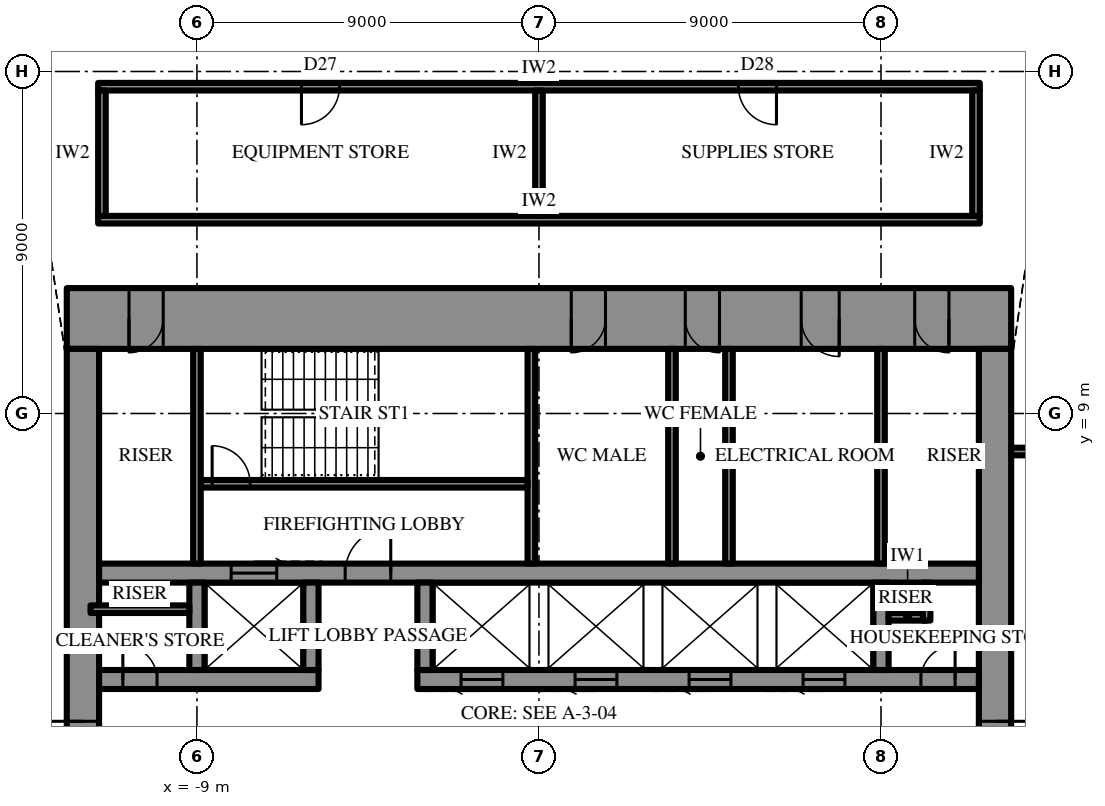
"""IFC4 building model, lengths in metres.
Left out: names, types, materials, properties, quantities, classifications, styles, units other than length and angle.
Written with IfcOpenShell. Run it as: python <this file> out.ifc"""

import sys

from ifc_helpers import new_model, si_unit, direction, frame, frame_2d, origin, place, context, subcontext, project, spatial, rectangle, extrude, element, fill, save


model = new_model("IFC4")
c1 = context("Model", 3, precision=1e-05, world=origin(), true_north=direction((0.0, 1.0)))
c2 = subcontext(c1, "Body", "Model", "MODEL_VIEW")
j1 = project(units=[si_unit("LENGTHUNIT", "METRE"), si_unit("PLANEANGLEUNIT", "RADIAN")], contexts=[c1])
p1 = place(None, origin())
s1 = spatial("IfcSite", under=j1, at=p1, CompositionType="ELEMENT")
p2 = place(p1, origin())
s2 = spatial("IfcBuilding", under=s1, at=p2, CompositionType="ELEMENT")
p3 = place(p2, frame((0.0, 0.0, 357.7)))
s3 = spatial("IfcBuildingStorey", under=s2, at=p3, CompositionType="ELEMENT", Elevation=357.7)
p4 = place(p3, frame((-12.425, 11.5, 0.0), z_axis=(0.0, 0.0, 1.0), x_axis=(1.0, 0.0, 0.0)))
e1 = element("IfcWall", 1, at=p4, inside=s3, PredefinedType="SHEAR", context=c2, shape_type="SweptSolid", body=[
    extrude(rectangle(XDim=24.85, YDim=1.6, at=frame_2d((12.425, 0.0))), origin(), (0.0, 0.0, 1.0), 4.2),
])
p5 = place(p4, frame((13.275, 0.0, 0.0)))
e2 = element("IfcOpeningElement", 2, at=p5, cuts=e1, PredefinedType="OPENING", context=c2, shape_type="SweptSolid", body=[
    extrude(rectangle(XDim=0.9, YDim=2.2, at=frame_2d((0.45, 1.1))), frame((0.0, 0.81, 0.0), z_axis=(0.0, -1.0, 0.0), x_axis=(1.0, 0.0, 0.0)), (0.0, 0.0, 1.0), 1.62),
])
p6 = place(p4, frame((16.275, 0.0, 0.0)))
e3 = element("IfcOpeningElement", 3, at=p6, cuts=e1, PredefinedType="OPENING", context=c2, shape_type="SweptSolid", body=[
    extrude(rectangle(XDim=0.9, YDim=2.2, at=frame_2d((0.45, 1.1))), frame((0.0, 0.81, 0.0), z_axis=(0.0, -1.0, 0.0), x_axis=(1.0, 0.0, 0.0)), (0.0, 0.0, 1.0), 1.62),
])
p7 = place(p4, frame((19.325, 0.0, 0.0)))
e4 = element("IfcOpeningElement", 4, at=p7, cuts=e1, PredefinedType="OPENING", context=c2, shape_type="SweptSolid", body=[
    extrude(rectangle(XDim=1.0, YDim=2.2, at=frame_2d((0.5, 1.1))), frame((0.0, 0.81, 0.0), z_axis=(0.0, -1.0, 0.0), x_axis=(1.0, 0.0, 0.0)), (0.0, 0.0, 1.0), 1.62),
])
p8 = place(p4, frame((1.637, 0.0, 0.0)))
e5 = element("IfcOpeningElement", 5, at=p8, cuts=e1, PredefinedType="OPENING", context=c2, shape_type="SweptSolid", body=[
    extrude(rectangle(XDim=0.9, YDim=2.2, at=frame_2d((0.45, 1.1))), frame((0.0, 0.81, 0.0), z_axis=(0.0, -1.0, 0.0), x_axis=(1.0, 0.0, 0.0)), (0.0, 0.0, 1.0), 1.62),
])
p9 = place(p4, frame((22.312, 0.0, 0.0)))
e6 = element("IfcOpeningElement", 6, at=p9, cuts=e1, PredefinedType="OPENING", context=c2, shape_type="SweptSolid", body=[
    extrude(rectangle(XDim=0.9, YDim=2.2, at=frame_2d((0.45, 1.1))), frame((0.0, 0.81, 0.0), z_axis=(0.0, -1.0, 0.0), x_axis=(1.0, 0.0, 0.0)), (0.0, 0.0, 1.0), 1.62),
])
p10 = place(p3, frame((12.0, -10.7, 0.0), z_axis=(0.0, 0.0, 1.0), x_axis=(0.0, 1.0, 0.0)))
e7 = element("IfcWall", 7, at=p10, inside=s3, PredefinedType="SHEAR", context=c2, shape_type="SweptSolid", body=[
    extrude(rectangle(XDim=21.4, YDim=0.85, at=frame_2d((10.7, 0.0))), origin(), (0.0, 0.0, 1.0), 4.2),
])
p11 = place(p10, frame((9.8, 0.0, 0.0)))
e8 = element("IfcOpeningElement", 8, at=p11, cuts=e7, PredefinedType="OPENING", context=c2, shape_type="SweptSolid", body=[
    extrude(rectangle(XDim=1.8, YDim=2.4, at=frame_2d((0.9, 1.2))), frame((0.0, 0.435, 0.0), z_axis=(0.0, -1.0, 0.0), x_axis=(1.0, 0.0, 0.0)), (0.0, 0.0, 1.0), 0.87),
])
p12 = place(p3, frame((-12.0, 10.7, 0.0), z_axis=(0.0, 0.0, 1.0), x_axis=(0.0, -1.0, 0.0)))
e9 = element("IfcWall", 9, at=p12, inside=s3, PredefinedType="SHEAR", context=c2, shape_type="SweptSolid", body=[
    extrude(rectangle(XDim=21.4, YDim=0.85, at=frame_2d((10.7, 0.0))), origin(), (0.0, 0.0, 1.0), 4.2),
])
p13 = place(p12, frame((9.8, 0.0, 0.0)))
e10 = element("IfcOpeningElement", 10, at=p13, cuts=e9, PredefinedType="OPENING", context=c2, shape_type="SweptSolid", body=[
    extrude(rectangle(XDim=1.8, YDim=2.4, at=frame_2d((0.9, 1.2))), frame((0.0, 0.435, 0.0), z_axis=(0.0, -1.0, 0.0), x_axis=(1.0, 0.0, 0.0)), (0.0, 0.0, 1.0), 0.87),
])
p14 = place(p3, frame((-11.575, 2.0, 0.0), z_axis=(0.0, 0.0, 1.0), x_axis=(1.0, 0.0, 0.0)))
e11 = element("IfcWall", 11, at=p14, inside=s3, PredefinedType="SHEAR", context=c2, shape_type="SweptSolid", body=[
    extrude(rectangle(XDim=5.775, YDim=0.5, at=frame_2d((2.887, 0.0))), origin(), (0.0, 0.0, 1.0), 4.2),
])
p15 = place(p14, frame((0.625, 0.0, 0.0)))
e12 = element("IfcOpeningElement", 12, at=p15, cuts=e11, PredefinedType="OPENING", context=c2, shape_type="SweptSolid", body=[
    extrude(rectangle(XDim=0.9, YDim=2.2, at=frame_2d((0.45, 1.1))), frame((0.0, 0.26, 0.0), z_axis=(0.0, -1.0, 0.0), x_axis=(1.0, 0.0, 0.0)), (0.0, 0.0, 1.0), 0.52),
])
p16 = place(p3, frame((-3.2, 2.0, 0.0), z_axis=(0.0, 0.0, 1.0), x_axis=(1.0, 0.0, 0.0)))
e13 = element("IfcWall", 13, at=p16, inside=s3, PredefinedType="SHEAR", context=c2, shape_type="SweptSolid", body=[
    extrude(rectangle(XDim=14.775, YDim=0.5, at=frame_2d((7.387, 0.0))), origin(), (0.0, 0.0, 1.0), 4.2),
])
p17 = place(p16, frame((13.25, 0.0, 0.0)))
e14 = element("IfcOpeningElement", 14, at=p17, cuts=e13, PredefinedType="OPENING", context=c2, shape_type="SweptSolid", body=[
    extrude(rectangle(XDim=0.9, YDim=2.2, at=frame_2d((0.45, 1.1))), frame((0.0, 0.26, 0.0), z_axis=(0.0, -1.0, 0.0), x_axis=(1.0, 0.0, 0.0)), (0.0, 0.0, 1.0), 0.52),
])
p18 = place(p16, frame((1.15, 0.0, 0.0)))
e15 = element("IfcOpeningElement", 15, at=p18, cuts=e13, PredefinedType="OPENING", context=c2, shape_type="SweptSolid", body=[
    extrude(rectangle(XDim=1.1, YDim=2.2, at=frame_2d((0.55, 1.1))), frame((0.0, 0.26, 0.0), z_axis=(0.0, -1.0, 0.0), x_axis=(1.0, 0.0, 0.0)), (0.0, 0.0, 1.0), 0.52),
])
p19 = place(p16, frame((4.15, 0.0, 0.0)))
e16 = element("IfcOpeningElement", 16, at=p19, cuts=e13, PredefinedType="OPENING", context=c2, shape_type="SweptSolid", body=[
    extrude(rectangle(XDim=1.1, YDim=2.2, at=frame_2d((0.55, 1.1))), frame((0.0, 0.26, 0.0), z_axis=(0.0, -1.0, 0.0), x_axis=(1.0, 0.0, 0.0)), (0.0, 0.0, 1.0), 0.52),
])
p20 = place(p16, frame((7.15, 0.0, 0.0)))
e17 = element("IfcOpeningElement", 17, at=p20, cuts=e13, PredefinedType="OPENING", context=c2, shape_type="SweptSolid", body=[
    extrude(rectangle(XDim=1.1, YDim=2.2, at=frame_2d((0.55, 1.1))), frame((0.0, 0.26, 0.0), z_axis=(0.0, -1.0, 0.0), x_axis=(1.0, 0.0, 0.0)), (0.0, 0.0, 1.0), 0.52),
])
p21 = place(p16, frame((10.15, 0.0, 0.0)))
e18 = element("IfcOpeningElement", 18, at=p21, cuts=e13, PredefinedType="OPENING", context=c2, shape_type="SweptSolid", body=[
    extrude(rectangle(XDim=1.1, YDim=2.2, at=frame_2d((0.55, 1.1))), frame((0.0, 0.26, 0.0), z_axis=(0.0, -1.0, 0.0), x_axis=(1.0, 0.0, 0.0)), (0.0, 0.0, 1.0), 0.52),
])
p22 = place(p3, frame((-11.575, 4.8, 0.0), z_axis=(0.0, 0.0, 1.0), x_axis=(1.0, 0.0, 0.0)))
e19 = element("IfcWall", 19, at=p22, inside=s3, PredefinedType="SHEAR", context=c2, shape_type="SweptSolid", body=[
    extrude(rectangle(XDim=23.15, YDim=0.5, at=frame_2d((11.575, 0.0))), origin(), (0.0, 0.0, 1.0), 4.2),
])
p23 = place(p22, frame((6.475, 0.0, 0.0)))
e20 = element("IfcOpeningElement", 20, at=p23, cuts=e19, PredefinedType="OPENING", context=c2, shape_type="SweptSolid", body=[
    extrude(rectangle(XDim=1.2, YDim=2.2, at=frame_2d((0.6, 1.1))), frame((0.0, 0.26, 0.0), z_axis=(0.0, -1.0, 0.0), x_axis=(1.0, 0.0, 0.0)), (0.0, 0.0, 1.0), 0.52),
])
p24 = place(p22, frame((3.475, 0.0, 0.0)))
e21 = element("IfcOpeningElement", 21, at=p24, cuts=e19, PredefinedType="OPENING", context=c2, shape_type="SweptSolid", body=[
    extrude(rectangle(XDim=1.2, YDim=2.2, at=frame_2d((0.6, 1.1))), frame((0.0, 0.26, 0.0), z_axis=(0.0, -1.0, 0.0), x_axis=(1.0, 0.0, 0.0)), (0.0, 0.0, 1.0), 0.52),
])
for number, where, z_axis, x_axis in (
    (22, (-9.0, 2.25, 0.0), (0.0, 0.0, 1.0), (0.0, 1.0, 0.0)),
    (23, (-6.0, 2.25, 0.0), (0.0, 0.0, 1.0), (0.0, 1.0, 0.0)),
    (24, (-3.0, 2.25, 0.0), (0.0, 0.0, 1.0), (0.0, 1.0, 0.0)),
    (25, (9.0, 2.25, 0.0), (0.0, 0.0, 1.0), (0.0, 1.0, 0.0)),
):
    element("IfcWall", number, at=place(p3, frame(where, z_axis=z_axis, x_axis=x_axis)), inside=s3, PredefinedType="SHEAR", context=c2, shape_type="SweptSolid", body=[
        extrude(rectangle(XDim=2.3, YDim=0.4, at=frame_2d((1.15, 0.0))), origin(), (0.0, 0.0, 1.0), 4.2),
    ])
p25 = place(p3, frame((-0.2, 5.05, 0.0), z_axis=(0.0, 0.0, 1.0), x_axis=(0.0, 1.0, 0.0)))
e26 = element("IfcWall", 26, at=p25, inside=s3, PredefinedType="SHEAR", context=c2, shape_type="SweptSolid", body=[
    extrude(rectangle(XDim=5.65, YDim=0.2, at=frame_2d((2.825, 0.0))), origin(), (0.0, 0.0, 1.0), 4.2),
])
p26 = place(p3, frame((-8.9, 7.15, 0.0), z_axis=(0.0, 0.0, 1.0), x_axis=(1.0, 0.0, 0.0)))
e27 = element("IfcWall", 27, at=p26, inside=s3, PredefinedType="SHEAR", context=c2, shape_type="SweptSolid", body=[
    extrude(rectangle(XDim=8.6, YDim=0.2, at=frame_2d((4.3, 0.0))), origin(), (0.0, 0.0, 1.0), 4.2),
])
p27 = place(p26, frame((0.3, 0.0, 0.0)))
e28 = element("IfcOpeningElement", 28, at=p27, cuts=e27, PredefinedType="OPENING", context=c2, shape_type="SweptSolid", body=[
    extrude(rectangle(XDim=1.0, YDim=2.2, at=frame_2d((0.5, 1.1))), frame((0.0, 0.11, 0.0), z_axis=(0.0, -1.0, 0.0), x_axis=(1.0, 0.0, 0.0)), (0.0, 0.0, 1.0), 0.22),
])
for number, where, z_axis, x_axis in (
    (29, (-9.0, 5.05, 0.0), (0.0, 0.0, 1.0), (0.0, 1.0, 0.0)),
    (30, (9.0, 5.05, 0.0), (0.0, 0.0, 1.0), (0.0, 1.0, 0.0)),
    (31, (3.5, 5.05, 0.0), (0.0, 0.0, 1.0), (0.0, 1.0, 0.0)),
    (32, (5.0, 5.05, 0.0), (0.0, 0.0, 1.0), (0.0, 1.0, 0.0)),
):
    element("IfcWall", number, at=place(p3, frame(where, z_axis=z_axis, x_axis=x_axis)), inside=s3, PredefinedType="PARTITIONING", context=c2, shape_type="SweptSolid", body=[
        extrude(rectangle(XDim=5.65, YDim=0.2, at=frame_2d((2.825, 0.0))), origin(), (0.0, 0.0, 1.0), 4.0),
    ])
p28 = place(p3, frame((-11.8, 3.85, 0.0), z_axis=(0.0, 0.0, 1.0), x_axis=(1.0, 0.0, 0.0)))
e33 = element("IfcWall", 33, at=p28, inside=s3, PredefinedType="PARTITIONING", context=c2, shape_type="SweptSolid", body=[
    extrude(rectangle(XDim=2.6, YDim=0.2, at=frame_2d((1.3, 0.0))), origin(), (0.0, 0.0, 1.0), 4.0),
])
for number, where, z_axis, x_axis in (
    (34, (9.2, 3.65, 0.0), (0.0, 0.0, 1.0), (1.0, 0.0, 0.0)),
    (35, (10.2, 3.55, 0.0), (0.0, 0.0, 1.0), (0.0, 1.0, 0.0)),
):
    element("IfcWall", number, at=place(p3, frame(where, z_axis=z_axis, x_axis=x_axis)), inside=s3, PredefinedType="PARTITIONING", context=c2, shape_type="SweptSolid", body=[
        extrude(rectangle(XDim=1.0, YDim=0.2, at=frame_2d((0.5, 0.0))), origin(), (0.0, 0.0, 1.0), 4.0),
    ])
p29 = place(p3, frame((-11.6, 14.1, 0.0), z_axis=(0.0, 0.0, 1.0), x_axis=(1.0, 0.0, 0.0)))
e36 = element("IfcWall", 36, at=p29, inside=s3, PredefinedType="PARTITIONING", context=c2, shape_type="SweptSolid", body=[
    extrude(rectangle(XDim=23.2, YDim=0.2, at=frame_2d((11.6, 0.0))), origin(), (0.0, 0.0, 1.0), 4.0),
])
p30 = place(p3, frame((-11.6, 17.6, 0.0), z_axis=(0.0, 0.0, 1.0), x_axis=(1.0, 0.0, 0.0)))
e37 = element("IfcWall", 37, at=p30, inside=s3, PredefinedType="PARTITIONING", context=c2, shape_type="SweptSolid", body=[
    extrude(rectangle(XDim=23.2, YDim=0.2, at=frame_2d((11.6, 0.0))), origin(), (0.0, 0.0, 1.0), 4.0),
])
p31 = place(p30, frame((5.35, 0.0, 0.0)))
e38 = element("IfcOpeningElement", 38, at=p31, cuts=e37, PredefinedType="OPENING", context=c2, shape_type="SweptSolid", body=[
    extrude(rectangle(XDim=1.0, YDim=2.2, at=frame_2d((0.5, 1.1))), frame((0.0, 0.11, 0.0), z_axis=(0.0, -1.0, 0.0), x_axis=(1.0, 0.0, 0.0)), (0.0, 0.0, 1.0), 0.22),
])
p32 = place(p30, frame((16.85, 0.0, 0.0)))
e39 = element("IfcOpeningElement", 39, at=p32, cuts=e37, PredefinedType="OPENING", context=c2, shape_type="SweptSolid", body=[
    extrude(rectangle(XDim=1.0, YDim=2.2, at=frame_2d((0.5, 1.1))), frame((0.0, 0.11, 0.0), z_axis=(0.0, -1.0, 0.0), x_axis=(1.0, 0.0, 0.0)), (0.0, 0.0, 1.0), 0.22),
])
p33 = place(p3, frame((-11.5, 14.2, 0.0), z_axis=(0.0, 0.0, 1.0), x_axis=(0.0, 1.0, 0.0)))
e40 = element("IfcWall", 40, at=p33, inside=s3, PredefinedType="PARTITIONING", context=c2, shape_type="SweptSolid", body=[
    extrude(rectangle(XDim=3.3, YDim=0.2, at=frame_2d((1.65, 0.0))), origin(), (0.0, 0.0, 1.0), 4.0),
])
p34 = place(p3, frame((0.0, 14.2, 0.0), z_axis=(0.0, 0.0, 1.0), x_axis=(0.0, 1.0, 0.0)))
e41 = element("IfcWall", 41, at=p34, inside=s3, PredefinedType="PARTITIONING", context=c2, shape_type="SweptSolid", body=[
    extrude(rectangle(XDim=3.3, YDim=0.2, at=frame_2d((1.65, 0.0))), origin(), (0.0, 0.0, 1.0), 2.992),
])
p35 = place(p3, frame((11.5, 14.2, 0.0), z_axis=(0.0, 0.0, 1.0), x_axis=(0.0, 1.0, 0.0)))
e42 = element("IfcWall", 42, at=p35, inside=s3, PredefinedType="PARTITIONING", context=c2, shape_type="SweptSolid", body=[
    extrude(rectangle(XDim=3.3, YDim=0.2, at=frame_2d((1.65, 0.0))), origin(), (0.0, 0.0, 1.0), 4.0),
])
p36 = place(p3, frame((12.425, 8.0, 0.0), z_axis=(0.0, 0.0, 1.0), x_axis=(1.0, 0.0, 0.0)))
e43 = element("IfcWall", 43, at=p36, inside=s3, PredefinedType="PARTITIONING", context=c2, shape_type="SweptSolid", body=[
    extrude(rectangle(XDim=13.59, YDim=0.2, at=frame_2d((6.795, 0.0))), origin(), (0.0, 0.0, 1.0), 4.0),
])
p37 = place(p36, frame((0.859, 0.0, 0.0)))
e44 = element("IfcOpeningElement", 44, at=p37, cuts=e43, PredefinedType="OPENING", context=c2, shape_type="SweptSolid", body=[
    extrude(rectangle(XDim=1.0, YDim=2.2, at=frame_2d((0.5, 1.1))), frame((0.0, 0.11, 0.0), z_axis=(0.0, -1.0, 0.0), x_axis=(1.0, 0.0, 0.0)), (0.0, 0.0, 1.0), 0.22),
])
p38 = place(p11, frame((1.8, 0.0, 0.0), z_axis=(0.0, 0.0, 1.0), x_axis=(-1.0, 0.0, 0.0)))
e45 = element("IfcDoor", 45, at=p38, inside=s3, OperationType="DOUBLE_DOOR_SINGLE_SWING", PredefinedType="DOOR", context=c2, shape_type="SweptSolid", body=[
    extrude(rectangle(XDim=1.8, YDim=2.4, at=frame_2d((0.9, 1.2))), frame((0.0, 0.025, 0.0), z_axis=(0.0, -1.0, 0.0), x_axis=(1.0, 0.0, 0.0)), (0.0, 0.0, 1.0), 0.05),
])
fill(e8, e45)
p39 = place(p13, frame((1.8, 0.0, 0.0), z_axis=(0.0, 0.0, 1.0), x_axis=(-1.0, 0.0, 0.0)))
e46 = element("IfcDoor", 46, at=p39, inside=s3, OperationType="DOUBLE_DOOR_SINGLE_SWING", PredefinedType="DOOR", context=c2, shape_type="SweptSolid", body=[
    extrude(rectangle(XDim=1.8, YDim=2.4, at=frame_2d((0.9, 1.2))), frame((0.0, 0.025, 0.0), z_axis=(0.0, -1.0, 0.0), x_axis=(1.0, 0.0, 0.0)), (0.0, 0.0, 1.0), 0.05),
])
fill(e10, e46)
p40 = place(p23, origin())
e47 = element("IfcDoor", 47, at=p40, inside=s3, OperationType="SINGLE_SWING_LEFT", PredefinedType="DOOR", context=c2, shape_type="SweptSolid", body=[
    extrude(rectangle(XDim=1.2, YDim=2.2, at=frame_2d((0.6, 1.1))), frame((0.0, 0.025, 0.0), z_axis=(0.0, -1.0, 0.0), x_axis=(1.0, 0.0, 0.0)), (0.0, 0.0, 1.0), 0.05),
])
fill(e20, e47)
p41 = place(p27, origin())
e48 = element("IfcDoor", 48, at=p41, inside=s3, OperationType="SINGLE_SWING_RIGHT", PredefinedType="DOOR", context=c2, shape_type="SweptSolid", body=[
    extrude(rectangle(XDim=1.0, YDim=2.2, at=frame_2d((0.5, 1.1))), frame((0.0, 0.025, 0.0), z_axis=(0.0, -1.0, 0.0), x_axis=(1.0, 0.0, 0.0)), (0.0, 0.0, 1.0), 0.05),
])
fill(e28, e48)
p42 = place(p5, frame((0.9, 0.0, 0.0), z_axis=(0.0, 0.0, 1.0), x_axis=(-1.0, 0.0, 0.0)))
e49 = element("IfcDoor", 49, at=p42, inside=s3, OperationType="SINGLE_SWING_LEFT", PredefinedType="DOOR", context=c2, shape_type="SweptSolid", body=[
    extrude(rectangle(XDim=0.9, YDim=2.2, at=frame_2d((0.45, 1.1))), frame((0.0, 0.025, 0.0), z_axis=(0.0, -1.0, 0.0), x_axis=(1.0, 0.0, 0.0)), (0.0, 0.0, 1.0), 0.05),
])
fill(e2, e49)
p43 = place(p6, frame((0.9, 0.0, 0.0), z_axis=(0.0, 0.0, 1.0), x_axis=(-1.0, 0.0, 0.0)))
e50 = element("IfcDoor", 50, at=p43, inside=s3, OperationType="SINGLE_SWING_RIGHT", PredefinedType="DOOR", context=c2, shape_type="SweptSolid", body=[
    extrude(rectangle(XDim=0.9, YDim=2.2, at=frame_2d((0.45, 1.1))), frame((0.0, 0.025, 0.0), z_axis=(0.0, -1.0, 0.0), x_axis=(1.0, 0.0, 0.0)), (0.0, 0.0, 1.0), 0.05),
])
fill(e3, e50)
p44 = place(p7, frame((1.0, 0.0, 0.0), z_axis=(0.0, 0.0, 1.0), x_axis=(-1.0, 0.0, 0.0)))
e51 = element("IfcDoor", 51, at=p44, inside=s3, OperationType="SINGLE_SWING_RIGHT", PredefinedType="DOOR", context=c2, shape_type="SweptSolid", body=[
    extrude(rectangle(XDim=1.0, YDim=2.2, at=frame_2d((0.5, 1.1))), frame((0.0, 0.025, 0.0), z_axis=(0.0, -1.0, 0.0), x_axis=(1.0, 0.0, 0.0)), (0.0, 0.0, 1.0), 0.05),
])
fill(e4, e51)
p45 = place(p8, frame((0.9, 0.0, 0.0), z_axis=(0.0, 0.0, 1.0), x_axis=(-1.0, 0.0, 0.0)))
e52 = element("IfcDoor", 52, at=p45, inside=s3, OperationType="SINGLE_SWING_LEFT", PredefinedType="DOOR", context=c2, shape_type="SweptSolid", body=[
    extrude(rectangle(XDim=0.9, YDim=2.2, at=frame_2d((0.45, 1.1))), frame((0.0, 0.025, 0.0), z_axis=(0.0, -1.0, 0.0), x_axis=(1.0, 0.0, 0.0)), (0.0, 0.0, 1.0), 0.05),
])
fill(e5, e52)
p46 = place(p9, frame((0.9, 0.0, 0.0), z_axis=(0.0, 0.0, 1.0), x_axis=(-1.0, 0.0, 0.0)))
e53 = element("IfcDoor", 53, at=p46, inside=s3, OperationType="SINGLE_SWING_RIGHT", PredefinedType="DOOR", context=c2, shape_type="SweptSolid", body=[
    extrude(rectangle(XDim=0.9, YDim=2.2, at=frame_2d((0.45, 1.1))), frame((0.0, 0.025, 0.0), z_axis=(0.0, -1.0, 0.0), x_axis=(1.0, 0.0, 0.0)), (0.0, 0.0, 1.0), 0.05),
])
fill(e6, e53)
p47 = place(p15, origin())
e54 = element("IfcDoor", 54, at=p47, inside=s3, OperationType="SINGLE_SWING_RIGHT", PredefinedType="DOOR", context=c2, shape_type="SweptSolid", body=[
    extrude(rectangle(XDim=0.9, YDim=2.2, at=frame_2d((0.45, 1.1))), frame((0.0, 0.025, 0.0), z_axis=(0.0, -1.0, 0.0), x_axis=(1.0, 0.0, 0.0)), (0.0, 0.0, 1.0), 0.05),
])
fill(e12, e54)
p48 = place(p17, origin())
e55 = element("IfcDoor", 55, at=p48, inside=s3, OperationType="SINGLE_SWING_LEFT", PredefinedType="DOOR", context=c2, shape_type="SweptSolid", body=[
    extrude(rectangle(XDim=0.9, YDim=2.2, at=frame_2d((0.45, 1.1))), frame((0.0, 0.025, 0.0), z_axis=(0.0, -1.0, 0.0), x_axis=(1.0, 0.0, 0.0)), (0.0, 0.0, 1.0), 0.05),
])
fill(e14, e55)
p49 = place(p24, origin())
e56 = element("IfcDoor", 56, at=p49, inside=s3, OperationType="SLIDING_TO_LEFT", PredefinedType="DOOR", context=c2, shape_type="SweptSolid", body=[
    extrude(rectangle(XDim=1.2, YDim=2.2, at=frame_2d((0.6, 1.1))), frame((0.0, 0.025, 0.0), z_axis=(0.0, -1.0, 0.0), x_axis=(1.0, 0.0, 0.0)), (0.0, 0.0, 1.0), 0.05),
])
fill(e21, e56)
p50 = place(p18, frame((1.1, 0.0, 0.0), z_axis=(0.0, 0.0, 1.0), x_axis=(-1.0, 0.0, 0.0)))
e57 = element("IfcDoor", 57, at=p50, inside=s3, OperationType="SLIDING_TO_LEFT", PredefinedType="DOOR", context=c2, shape_type="SweptSolid", body=[
    extrude(rectangle(XDim=1.1, YDim=2.2, at=frame_2d((0.55, 1.1))), frame((0.0, 0.025, 0.0), z_axis=(0.0, -1.0, 0.0), x_axis=(1.0, 0.0, 0.0)), (0.0, 0.0, 1.0), 0.05),
])
fill(e15, e57)
p51 = place(p19, frame((1.1, 0.0, 0.0), z_axis=(0.0, 0.0, 1.0), x_axis=(-1.0, 0.0, 0.0)))
e58 = element("IfcDoor", 58, at=p51, inside=s3, OperationType="SLIDING_TO_LEFT", PredefinedType="DOOR", context=c2, shape_type="SweptSolid", body=[
    extrude(rectangle(XDim=1.1, YDim=2.2, at=frame_2d((0.55, 1.1))), frame((0.0, 0.025, 0.0), z_axis=(0.0, -1.0, 0.0), x_axis=(1.0, 0.0, 0.0)), (0.0, 0.0, 1.0), 0.05),
])
fill(e16, e58)
p52 = place(p20, frame((1.1, 0.0, 0.0), z_axis=(0.0, 0.0, 1.0), x_axis=(-1.0, 0.0, 0.0)))
e59 = element("IfcDoor", 59, at=p52, inside=s3, OperationType="SLIDING_TO_LEFT", PredefinedType="DOOR", context=c2, shape_type="SweptSolid", body=[
    extrude(rectangle(XDim=1.1, YDim=2.2, at=frame_2d((0.55, 1.1))), frame((0.0, 0.025, 0.0), z_axis=(0.0, -1.0, 0.0), x_axis=(1.0, 0.0, 0.0)), (0.0, 0.0, 1.0), 0.05),
])
fill(e17, e59)
p53 = place(p21, frame((1.1, 0.0, 0.0), z_axis=(0.0, 0.0, 1.0), x_axis=(-1.0, 0.0, 0.0)))
e60 = element("IfcDoor", 60, at=p53, inside=s3, OperationType="SLIDING_TO_LEFT", PredefinedType="DOOR", context=c2, shape_type="SweptSolid", body=[
    extrude(rectangle(XDim=1.1, YDim=2.2, at=frame_2d((0.55, 1.1))), frame((0.0, 0.025, 0.0), z_axis=(0.0, -1.0, 0.0), x_axis=(1.0, 0.0, 0.0)), (0.0, 0.0, 1.0), 0.05),
])
fill(e18, e60)
p54 = place(p31, frame((1.0, 0.0, 0.0), z_axis=(0.0, 0.0, 1.0), x_axis=(-1.0, 0.0, 0.0)))
e61 = element("IfcDoor", 61, at=p54, inside=s3, OperationType="SINGLE_SWING_LEFT", PredefinedType="DOOR", context=c2, shape_type="SweptSolid", body=[
    extrude(rectangle(XDim=1.0, YDim=2.2, at=frame_2d((0.5, 1.1))), frame((0.0, 0.025, 0.0), z_axis=(0.0, -1.0, 0.0), x_axis=(1.0, 0.0, 0.0)), (0.0, 0.0, 1.0), 0.05),
])
fill(e38, e61)
p55 = place(p32, frame((1.0, 0.0, 0.0), z_axis=(0.0, 0.0, 1.0), x_axis=(-1.0, 0.0, 0.0)))
e62 = element("IfcDoor", 62, at=p55, inside=s3, OperationType="SINGLE_SWING_RIGHT", PredefinedType="DOOR", context=c2, shape_type="SweptSolid", body=[
    extrude(rectangle(XDim=1.0, YDim=2.2, at=frame_2d((0.5, 1.1))), frame((0.0, 0.025, 0.0), z_axis=(0.0, -1.0, 0.0), x_axis=(1.0, 0.0, 0.0)), (0.0, 0.0, 1.0), 0.05),
])
fill(e39, e62)
save(model, sys.argv[1])
